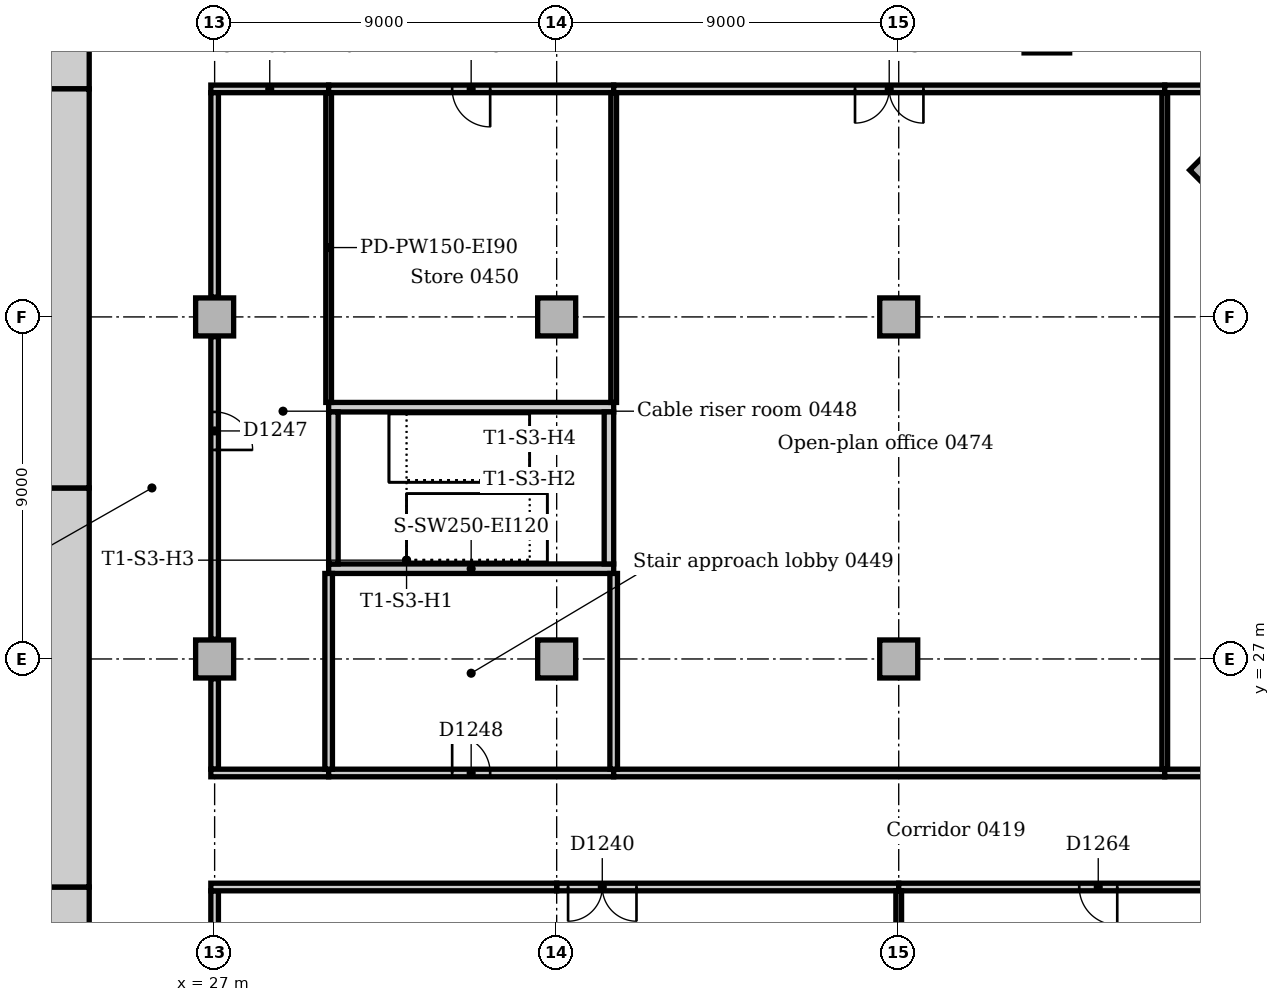
"""IFC4 building model, lengths in metres.
Left out: names, types, materials, properties, quantities, classifications, styles, units other than length and angle.
Written with IfcOpenShell. Run it as: python <this file> out.ifc"""

import sys

from ifc_helpers import new_model, si_unit, direction, frame, frame_2d, origin, origin_2d, place, context, subcontext, project, spatial, rectangle, extrude, element, fill, save


model = new_model("IFC4")
c1 = context("Model", 3, precision=1e-05, world=origin(), true_north=direction((0.0, 1.0)))
c2 = subcontext(c1, "Body", "Model", "MODEL_VIEW")
j1 = project(units=[si_unit("LENGTHUNIT", "METRE"), si_unit("PLANEANGLEUNIT", "RADIAN")], contexts=[c1])
p1 = place(None, origin())
s1 = spatial("IfcSite", under=j1, at=p1, CompositionType="ELEMENT")
p2 = place(p1, origin())
s2 = spatial("IfcBuilding", under=s1, at=p2, CompositionType="ELEMENT")
p3 = place(p2, frame((0.0, 0.0, 21.0)))
s3 = spatial("IfcBuildingStorey", under=s2, at=p3, CompositionType="ELEMENT", Elevation=21.0)
for number, where, z_axis, x_axis in (
    (1, (3.9, 20.4, 0.0), (0.0, 0.0, 1.0), (1.0, 0.0, 0.0)),
    (2, (23.7, 42.6, 0.0), (0.0, 0.0, 1.0), (-1.0, 0.0, 0.0)),
):
    element("IfcWall", number, at=place(p3, frame(where, z_axis=z_axis, x_axis=x_axis)), inside=s3, PredefinedType="SOLIDWALL", context=c2, shape_type="SweptSolid", body=[
        extrude(rectangle(XDim=19.8, YDim=1.2, at=frame_2d((9.9, 0.0))), origin(), (0.0, 0.0, 1.0), 5.0),
    ])
p4 = place(p3, frame((23.1, 21.0, 0.0), z_axis=(0.0, 0.0, 1.0), x_axis=(0.0, 1.0, 0.0)))
e3 = element("IfcWall", 3, at=p4, inside=s3, PredefinedType="SOLIDWALL", context=c2, shape_type="SweptSolid", body=[
    extrude(rectangle(XDim=10.5, YDim=1.2, at=frame_2d((5.25, 0.0))), origin(), (0.0, 0.0, 1.0), 5.0),
])
p5 = place(p4, frame((4.35, 0.0, 0.0)))
e4 = element("IfcOpeningElement", 4, at=p5, cuts=e3, PredefinedType="OPENING", context=c2, shape_type="SweptSolid", body=[
    extrude(rectangle(XDim=1.8, YDim=2.1, at=frame_2d((0.9, 1.05))), frame((0.0, 0.61, 0.0), z_axis=(0.0, -1.0, 0.0), x_axis=(1.0, 0.0, 0.0)), (0.0, 0.0, 1.0), 1.22),
])
p6 = place(p3, frame((23.1, 31.5, 0.0), z_axis=(0.0, 0.0, 1.0), x_axis=(0.0, 1.0, 0.0)))
e5 = element("IfcWall", 5, at=p6, inside=s3, PredefinedType="SOLIDWALL", context=c2, shape_type="SweptSolid", body=[
    extrude(rectangle(XDim=10.5, YDim=1.2, at=frame_2d((5.25, 0.0))), origin(), (0.0, 0.0, 1.0), 5.0),
])
p7 = place(p6, frame((3.15, 0.0, 0.0)))
e6 = element("IfcOpeningElement", 6, at=p7, cuts=e5, PredefinedType="OPENING", context=c2, shape_type="SweptSolid", body=[
    extrude(rectangle(XDim=1.0, YDim=2.1, at=frame_2d((0.5, 1.05))), frame((0.0, 0.61, 0.0), z_axis=(0.0, -1.0, 0.0), x_axis=(1.0, 0.0, 0.0)), (0.0, 0.0, 1.0), 1.22),
])
p8 = place(p6, frame((5.2, 0.0, 0.0)))
e7 = element("IfcOpeningElement", 7, at=p8, cuts=e5, PredefinedType="OPENING", context=c2, shape_type="SweptSolid", body=[
    extrude(rectangle(XDim=1.0, YDim=2.1, at=frame_2d((0.5, 1.05))), frame((0.0, 0.61, 0.0), z_axis=(0.0, -1.0, 0.0), x_axis=(1.0, 0.0, 0.0)), (0.0, 0.0, 1.0), 1.22),
])
for number, where, z_axis, x_axis in (
    (8, (30.0, 29.375, 0.0), (0.0, 0.0, 1.0), (1.0, 0.0, 0.0)),
    (9, (37.5, 33.625, 0.0), (0.0, 0.0, 1.0), (-1.0, 0.0, 0.0)),
):
    element("IfcWall", number, at=place(p3, frame(where, z_axis=z_axis, x_axis=x_axis)), inside=s3, PredefinedType="SOLIDWALL", context=c2, shape_type="SweptSolid", body=[
        extrude(rectangle(XDim=7.5, YDim=0.25, at=frame_2d((3.75, 0.0))), origin(), (0.0, 0.0, 1.0), 5.0),
    ])
for number, where, z_axis, x_axis in (
    (10, (37.375, 29.5, 0.0), (0.0, 0.0, 1.0), (0.0, 1.0, 0.0)),
    (11, (30.125, 33.5, 0.0), (0.0, 0.0, 1.0), (0.0, -1.0, 0.0)),
):
    element("IfcWall", number, at=place(p3, frame(where, z_axis=z_axis, x_axis=x_axis)), inside=s3, PredefinedType="SOLIDWALL", context=c2, shape_type="SweptSolid", body=[
        extrude(rectangle(XDim=4.0, YDim=0.25, at=frame_2d((2.0, 0.0))), origin(), (0.0, 0.0, 1.0), 5.0),
    ])
p9 = place(p3, frame((48.898, 43.547, 0.0), z_axis=(0.0, 0.0, 1.0), x_axis=(1.0, 0.0, 0.0)))
e12 = element("IfcColumn", 12, at=p9, inside=s3, PredefinedType="COLUMN", context=c2, shape_type="SweptSolid", body=[
    extrude(rectangle(XDim=1.2, YDim=1.2, at=origin_2d()), origin(), (0.0, 0.0, 1.0), 4.85),
])
for number, where, z_axis, x_axis in (
    (13, (53.364, 39.864, 0.0), (0.0, 0.0, 1.0), (0.707, 0.707, 0.0)),
    (14, (27.0, 27.0, 0.0), (0.0, 0.0, 1.0), (1.0, 0.0, 0.0)),
    (15, (27.0, 36.0, 0.0), (0.0, 0.0, 1.0), (1.0, 0.0, 0.0)),
    (16, (36.0, 27.0, 0.0), (0.0, 0.0, 1.0), (1.0, 0.0, 0.0)),
    (17, (36.0, 36.0, 0.0), (0.0, 0.0, 1.0), (1.0, 0.0, 0.0)),
    (18, (45.0, 27.0, 0.0), (0.0, 0.0, 1.0), (1.0, 0.0, 0.0)),
    (19, (45.0, 36.0, 0.0), (0.0, 0.0, 1.0), (1.0, 0.0, 0.0)),
):
    element("IfcColumn", number, at=place(p3, frame(where, z_axis=z_axis, x_axis=x_axis)), inside=s3, PredefinedType="COLUMN", context=c2, shape_type="SweptSolid", body=[
        extrude(rectangle(XDim=1.0, YDim=1.0, at=origin_2d()), origin(), (0.0, 0.0, 1.0), 4.85),
    ])
p10 = place(p3, frame((26.9, 42.0, 0.0), z_axis=(0.0, 0.0, 1.0), x_axis=(1.0, 0.0, 0.0)))
e20 = element("IfcWall", 20, at=p10, inside=s3, PredefinedType="PARTITIONING", context=c2, shape_type="SweptSolid", body=[
    extrude(rectangle(XDim=3.1, YDim=0.2, at=frame_2d((1.55, 0.0))), origin(), (0.0, 0.0, 1.0), 4.85),
])
p11 = place(p3, frame((30.0, 42.0, 0.0), z_axis=(0.0, 0.0, 1.0), x_axis=(1.0, 0.0, 0.0)))
e21 = element("IfcWall", 21, at=p11, inside=s3, PredefinedType="PARTITIONING", context=c2, shape_type="SweptSolid", body=[
    extrude(rectangle(XDim=7.5, YDim=0.2, at=frame_2d((3.75, 0.0))), origin(), (0.0, 0.0, 1.0), 4.85),
])
p12 = place(p11, frame((3.25, 0.0, 0.0)))
e22 = element("IfcOpeningElement", 22, at=p12, cuts=e21, PredefinedType="OPENING", context=c2, shape_type="SweptSolid", body=[
    extrude(rectangle(XDim=1.0, YDim=2.1, at=frame_2d((0.5, 1.05))), frame((0.0, 0.11, 0.0), z_axis=(0.0, -1.0, 0.0), x_axis=(1.0, 0.0, 0.0)), (0.0, 0.0, 1.0), 0.22),
])
p13 = place(p3, frame((37.5, 42.0, 0.0), z_axis=(0.0, 0.0, 1.0), x_axis=(1.0, 0.0, 0.0)))
e23 = element("IfcWall", 23, at=p13, inside=s3, PredefinedType="PARTITIONING", context=c2, shape_type="SweptSolid", body=[
    extrude(rectangle(XDim=14.5, YDim=0.2, at=frame_2d((7.25, 0.0))), origin(), (0.0, 0.0, 1.0), 4.85),
])
p14 = place(p13, frame((6.35, 0.0, 0.0)))
e24 = element("IfcOpeningElement", 24, at=p14, cuts=e23, PredefinedType="OPENING", context=c2, shape_type="SweptSolid", body=[
    extrude(rectangle(XDim=1.8, YDim=2.1, at=frame_2d((0.9, 1.05))), frame((0.0, 0.11, 0.0), z_axis=(0.0, -1.0, 0.0), x_axis=(1.0, 0.0, 0.0)), (0.0, 0.0, 1.0), 0.22),
])
p15 = place(p3, frame((52.0, 42.0, 0.0), z_axis=(0.0, 0.0, 1.0), x_axis=(1.0, 0.0, 0.0)))
e25 = element("IfcWall", 25, at=p15, inside=s3, PredefinedType="PARTITIONING", context=c2, shape_type="SweptSolid", body=[
    extrude(rectangle(XDim=13.6, YDim=0.2, at=frame_2d((6.8, 0.0))), origin(), (0.0, 0.0, 1.0), 4.7),
])
p16 = place(p15, frame((6.1, 0.0, 0.0)))
e26 = element("IfcOpeningElement", 26, at=p16, cuts=e25, PredefinedType="OPENING", context=c2, shape_type="SweptSolid", body=[
    extrude(rectangle(XDim=1.8, YDim=2.1, at=frame_2d((0.9, 1.05))), frame((0.0, 0.11, 0.0), z_axis=(0.0, -1.0, 0.0), x_axis=(1.0, 0.0, 0.0)), (0.0, 0.0, 1.0), 0.22),
])
for number, where, z_axis, x_axis in (
    (27, (27.0, 18.52, 0.0), (0.0, 0.0, 1.0), (0.0, 1.0, 0.0)),
    (28, (27.0, 24.1, 0.0), (0.0, 0.0, 1.0), (0.0, 1.0, 0.0)),
):
    element("IfcWall", number, at=place(p3, frame(where, z_axis=z_axis, x_axis=x_axis)), inside=s3, PredefinedType="PARTITIONING", context=c2, shape_type="SweptSolid", body=[
        extrude(rectangle(XDim=2.38, YDim=0.2, at=frame_2d((1.19, 0.0))), origin(), (0.0, 0.0, 1.0), 4.158),
    ])
p17 = place(p3, frame((27.0, 27.52, 0.0), z_axis=(0.0, 0.0, 1.0), x_axis=(0.0, 1.0, 0.0)))
e29 = element("IfcWall", 29, at=p17, inside=s3, PredefinedType="PARTITIONING", context=c2, shape_type="SweptSolid", body=[
    extrude(rectangle(XDim=7.96, YDim=0.2, at=frame_2d((3.98, 0.0))), origin(), (0.0, 0.0, 1.0), 4.158),
])
p18 = place(p17, frame((4.98, 0.0, 0.0)))
e30 = element("IfcOpeningElement", 30, at=p18, cuts=e29, PredefinedType="OPENING", context=c2, shape_type="SweptSolid", body=[
    extrude(rectangle(XDim=1.0, YDim=2.1, at=frame_2d((0.5, 1.05))), frame((0.0, 0.11, 0.0), z_axis=(0.0, -1.0, 0.0), x_axis=(1.0, 0.0, 0.0)), (0.0, 0.0, 1.0), 0.22),
])
p19 = place(p3, frame((27.0, 36.52, 0.0), z_axis=(0.0, 0.0, 1.0), x_axis=(0.0, 1.0, 0.0)))
e31 = element("IfcWall", 31, at=p19, inside=s3, PredefinedType="PARTITIONING", context=c2, shape_type="SweptSolid", body=[
    extrude(rectangle(XDim=5.38, YDim=0.2, at=frame_2d((2.69, 0.0))), origin(), (0.0, 0.0, 1.0), 4.158),
])
p20 = place(p3, frame((36.0, 21.0, 0.0), z_axis=(0.0, 0.0, 1.0), x_axis=(1.0, 0.0, 0.0)))
e32 = element("IfcWall", 32, at=p20, inside=s3, PredefinedType="PARTITIONING", context=c2, shape_type="SweptSolid", body=[
    extrude(rectangle(XDim=9.0, YDim=0.2, at=frame_2d((4.5, 0.0))), origin(), (0.0, 0.0, 1.0), 4.85),
])
p21 = place(p20, frame((0.3, 0.0, 0.0)))
e33 = element("IfcOpeningElement", 33, at=p21, cuts=e32, PredefinedType="OPENING", context=c2, shape_type="SweptSolid", body=[
    extrude(rectangle(XDim=1.8, YDim=2.1, at=frame_2d((0.9, 1.05))), frame((0.0, 0.11, 0.0), z_axis=(0.0, -1.0, 0.0), x_axis=(1.0, 0.0, 0.0)), (0.0, 0.0, 1.0), 0.22),
])
p22 = place(p3, frame((26.9, 21.0, 0.0), z_axis=(0.0, 0.0, 1.0), x_axis=(1.0, 0.0, 0.0)))
e34 = element("IfcWall", 34, at=p22, inside=s3, PredefinedType="PARTITIONING", context=c2, shape_type="SweptSolid", body=[
    extrude(rectangle(XDim=9.1, YDim=0.2, at=frame_2d((4.55, 0.0))), origin(), (0.0, 0.0, 1.0), 4.85),
])
p23 = place(p3, frame((26.9, 24.0, 0.0), z_axis=(0.0, 0.0, 1.0), x_axis=(1.0, 0.0, 0.0)))
e35 = element("IfcWall", 35, at=p23, inside=s3, PredefinedType="PARTITIONING", context=c2, shape_type="SweptSolid", body=[
    extrude(rectangle(XDim=3.1, YDim=0.2, at=frame_2d((1.55, 0.0))), origin(), (0.0, 0.0, 1.0), 4.85),
])
p24 = place(p3, frame((30.0, 24.0, 0.0), z_axis=(0.0, 0.0, 1.0), x_axis=(1.0, 0.0, 0.0)))
e36 = element("IfcWall", 36, at=p24, inside=s3, PredefinedType="PARTITIONING", context=c2, shape_type="SweptSolid", body=[
    extrude(rectangle(XDim=7.5, YDim=0.2, at=frame_2d((3.75, 0.0))), origin(), (0.0, 0.0, 1.0), 4.85),
])
p25 = place(p24, frame((3.25, 0.0, 0.0)))
e37 = element("IfcOpeningElement", 37, at=p25, cuts=e36, PredefinedType="OPENING", context=c2, shape_type="SweptSolid", body=[
    extrude(rectangle(XDim=1.0, YDim=2.1, at=frame_2d((0.5, 1.05))), frame((0.0, 0.11, 0.0), z_axis=(0.0, -1.0, 0.0), x_axis=(1.0, 0.0, 0.0)), (0.0, 0.0, 1.0), 0.22),
])
p26 = place(p3, frame((45.0, 21.0, 0.0), z_axis=(0.0, 0.0, 1.0), x_axis=(1.0, 0.0, 0.0)))
e38 = element("IfcWall", 38, at=p26, inside=s3, PredefinedType="PARTITIONING", context=c2, shape_type="SweptSolid", body=[
    extrude(rectangle(XDim=10.5, YDim=0.2, at=frame_2d((5.25, 0.0))), origin(), (0.0, 0.0, 1.0), 4.85),
])
p27 = place(p26, frame((4.75, 0.0, 0.0)))
e39 = element("IfcOpeningElement", 39, at=p27, cuts=e38, PredefinedType="OPENING", context=c2, shape_type="SweptSolid", body=[
    extrude(rectangle(XDim=1.0, YDim=2.1, at=frame_2d((0.5, 1.05))), frame((0.0, 0.11, 0.0), z_axis=(0.0, -1.0, 0.0), x_axis=(1.0, 0.0, 0.0)), (0.0, 0.0, 1.0), 0.22),
])
p28 = place(p3, frame((37.5, 24.0, 0.0), z_axis=(0.0, 0.0, 1.0), x_axis=(1.0, 0.0, 0.0)))
e40 = element("IfcWall", 40, at=p28, inside=s3, PredefinedType="PARTITIONING", context=c2, shape_type="SweptSolid", body=[
    extrude(rectangle(XDim=14.5, YDim=0.2, at=frame_2d((7.25, 0.0))), origin(), (0.0, 0.0, 1.0), 4.85),
])
p29 = place(p3, frame((52.0, 24.0, 0.0), z_axis=(0.0, 0.0, 1.0), x_axis=(1.0, 0.0, 0.0)))
e41 = element("IfcWall", 41, at=p29, inside=s3, PredefinedType="PARTITIONING", context=c2, shape_type="SweptSolid", body=[
    extrude(rectangle(XDim=13.6, YDim=0.2, at=frame_2d((6.8, 0.0))), origin(), (0.0, 0.0, 1.0), 4.7),
])
p30 = place(p3, frame((45.0, 18.52, 0.0), z_axis=(0.0, 0.0, 1.0), x_axis=(0.0, 1.0, 0.0)))
e42 = element("IfcWall", 42, at=p30, inside=s3, PredefinedType="PARTITIONING", context=c2, shape_type="SweptSolid", body=[
    extrude(rectangle(XDim=2.38, YDim=0.15, at=frame_2d((1.19, 0.0))), origin(), (0.0, 0.0, 1.0), 4.158),
])
p31 = place(p3, frame((30.0, 24.1, 0.0), z_axis=(0.0, 0.0, 1.0), x_axis=(0.0, 1.0, 0.0)))
e43 = element("IfcWall", 43, at=p31, inside=s3, PredefinedType="PARTITIONING", context=c2, shape_type="SweptSolid", body=[
    extrude(rectangle(XDim=5.15, YDim=0.2, at=frame_2d((2.575, 0.0))), origin(), (0.0, 0.0, 1.0), 4.85),
])
p32 = place(p3, frame((30.0, 33.75, 0.0), z_axis=(0.0, 0.0, 1.0), x_axis=(0.0, 1.0, 0.0)))
e44 = element("IfcWall", 44, at=p32, inside=s3, PredefinedType="PARTITIONING", context=c2, shape_type="SweptSolid", body=[
    extrude(rectangle(XDim=8.15, YDim=0.15, at=frame_2d((4.075, 0.0))), origin(), (0.0, 0.0, 1.0), 4.85),
])
p33 = place(p3, frame((37.5, 24.1, 0.0), z_axis=(0.0, 0.0, 1.0), x_axis=(0.0, 1.0, 0.0)))
e45 = element("IfcWall", 45, at=p33, inside=s3, PredefinedType="PARTITIONING", context=c2, shape_type="SweptSolid", body=[
    extrude(rectangle(XDim=5.15, YDim=0.2, at=frame_2d((2.575, 0.0))), origin(), (0.0, 0.0, 1.0), 4.85),
])
p34 = place(p3, frame((37.5, 33.75, 0.0), z_axis=(0.0, 0.0, 1.0), x_axis=(0.0, 1.0, 0.0)))
e46 = element("IfcWall", 46, at=p34, inside=s3, PredefinedType="PARTITIONING", context=c2, shape_type="SweptSolid", body=[
    extrude(rectangle(XDim=8.15, YDim=0.15, at=frame_2d((4.075, 0.0))), origin(), (0.0, 0.0, 1.0), 4.85),
])
p35 = place(p3, frame((52.0, 24.1, 0.0), z_axis=(0.0, 0.0, 1.0), x_axis=(0.0, 1.0, 0.0)))
e47 = element("IfcWall", 47, at=p35, inside=s3, PredefinedType="PARTITIONING", context=c2, shape_type="SweptSolid", body=[
    extrude(rectangle(XDim=17.8, YDim=0.15, at=frame_2d((8.9, 0.0))), origin(), (0.0, 0.0, 1.0), 4.85),
])
p36 = place(p21, frame((1.8, 0.0, 0.0), z_axis=(0.0, 0.0, 1.0), x_axis=(-1.0, 0.0, 0.0)))
e48 = element("IfcDoor", 48, at=p36, inside=s3, OperationType="DOUBLE_DOOR_SINGLE_SWING", PredefinedType="DOOR", context=c2, shape_type="SweptSolid", body=[
    extrude(rectangle(XDim=1.8, YDim=2.1, at=frame_2d((0.9, 1.05))), frame((0.0, 0.025, 0.0), z_axis=(0.0, -1.0, 0.0), x_axis=(1.0, 0.0, 0.0)), (0.0, 0.0, 1.0), 0.05),
])
fill(e33, e48)
p37 = place(p18, frame((1.0, 0.0, 0.0), z_axis=(0.0, 0.0, 1.0), x_axis=(-1.0, 0.0, 0.0)))
e49 = element("IfcDoor", 49, at=p37, inside=s3, OperationType="SINGLE_SWING_RIGHT", PredefinedType="DOOR", context=c2, shape_type="SweptSolid", body=[
    extrude(rectangle(XDim=1.0, YDim=2.1, at=frame_2d((0.5, 1.05))), frame((0.0, 0.025, 0.0), z_axis=(0.0, -1.0, 0.0), x_axis=(1.0, 0.0, 0.0)), (0.0, 0.0, 1.0), 0.05),
])
fill(e30, e49)
p38 = place(p25, origin())
e50 = element("IfcDoor", 50, at=p38, inside=s3, OperationType="SINGLE_SWING_LEFT", PredefinedType="DOOR", context=c2, shape_type="SweptSolid", body=[
    extrude(rectangle(XDim=1.0, YDim=2.1, at=frame_2d((0.5, 1.05))), frame((0.0, 0.025, 0.0), z_axis=(0.0, -1.0, 0.0), x_axis=(1.0, 0.0, 0.0)), (0.0, 0.0, 1.0), 0.05),
])
fill(e37, e50)
p39 = place(p12, frame((1.0, 0.0, 0.0), z_axis=(0.0, 0.0, 1.0), x_axis=(-1.0, 0.0, 0.0)))
e51 = element("IfcDoor", 51, at=p39, inside=s3, OperationType="SINGLE_SWING_LEFT", PredefinedType="DOOR", context=c2, shape_type="SweptSolid", body=[
    extrude(rectangle(XDim=1.0, YDim=2.1, at=frame_2d((0.5, 1.05))), frame((0.0, 0.025, 0.0), z_axis=(0.0, -1.0, 0.0), x_axis=(1.0, 0.0, 0.0)), (0.0, 0.0, 1.0), 0.05),
])
fill(e22, e51)
p40 = place(p27, frame((1.0, 0.0, 0.0), z_axis=(0.0, 0.0, 1.0), x_axis=(-1.0, 0.0, 0.0)))
e52 = element("IfcDoor", 52, at=p40, inside=s3, OperationType="SINGLE_SWING_LEFT", PredefinedType="DOOR", context=c2, shape_type="SweptSolid", body=[
    extrude(rectangle(XDim=1.0, YDim=2.1, at=frame_2d((0.5, 1.05))), frame((0.0, 0.025, 0.0), z_axis=(0.0, -1.0, 0.0), x_axis=(1.0, 0.0, 0.0)), (0.0, 0.0, 1.0), 0.05),
])
fill(e39, e52)
p41 = place(p14, frame((1.8, 0.0, 0.0), z_axis=(0.0, 0.0, 1.0), x_axis=(-1.0, 0.0, 0.0)))
e53 = element("IfcDoor", 53, at=p41, inside=s3, OperationType="DOUBLE_DOOR_SINGLE_SWING", PredefinedType="DOOR", context=c2, shape_type="SweptSolid", body=[
    extrude(rectangle(XDim=1.8, YDim=2.1, at=frame_2d((0.9, 1.05))), frame((0.0, 0.025, 0.0), z_axis=(0.0, -1.0, 0.0), x_axis=(1.0, 0.0, 0.0)), (0.0, 0.0, 1.0), 0.05),
])
fill(e24, e53)
p42 = place(p5, origin())
e54 = element("IfcDoor", 54, at=p42, inside=s3, OperationType="DOUBLE_DOOR_DOUBLE_SWING", PredefinedType="DOOR", context=c2, shape_type="SweptSolid", body=[
    extrude(rectangle(XDim=1.8, YDim=2.1, at=frame_2d((0.9, 1.05))), frame((0.0, 0.025, 0.0), z_axis=(0.0, -1.0, 0.0), x_axis=(1.0, 0.0, 0.0)), (0.0, 0.0, 1.0), 0.05),
])
fill(e4, e54)
p43 = place(p7, frame((1.0, 0.0, 0.0), z_axis=(0.0, 0.0, 1.0), x_axis=(-1.0, 0.0, 0.0)))
e55 = element("IfcDoor", 55, at=p43, inside=s3, OperationType="SINGLE_SWING_RIGHT", PredefinedType="DOOR", context=c2, shape_type="SweptSolid", body=[
    extrude(rectangle(XDim=1.0, YDim=2.1, at=frame_2d((0.5, 1.05))), frame((0.0, 0.025, 0.0), z_axis=(0.0, -1.0, 0.0), x_axis=(1.0, 0.0, 0.0)), (0.0, 0.0, 1.0), 0.05),
])
fill(e6, e55)
p44 = place(p8, frame((1.0, 0.0, 0.0), z_axis=(0.0, 0.0, 1.0), x_axis=(-1.0, 0.0, 0.0)))
e56 = element("IfcDoor", 56, at=p44, inside=s3, OperationType="SINGLE_SWING_LEFT", PredefinedType="DOOR", context=c2, shape_type="SweptSolid", body=[
    extrude(rectangle(XDim=1.0, YDim=2.1, at=frame_2d((0.5, 1.05))), frame((0.0, 0.025, 0.0), z_axis=(0.0, -1.0, 0.0), x_axis=(1.0, 0.0, 0.0)), (0.0, 0.0, 1.0), 0.05),
])
fill(e7, e56)
save(model, sys.argv[1])
